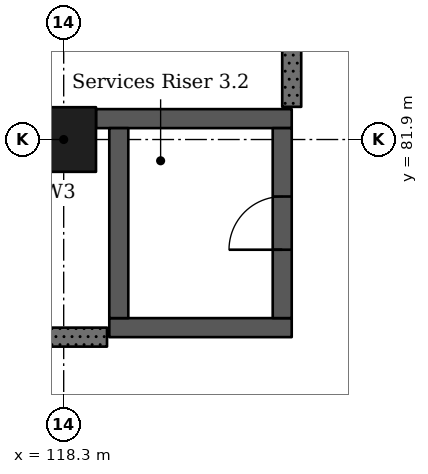
"""IFC4 building model, lengths in metres.
Left out: names, types, materials, properties, quantities, classifications, styles, units other than length and angle.
Written with IfcOpenShell. Run it as: python <this file> out.ifc"""

import sys

from ifc_helpers import new_model, si_unit, direction, frame, frame_2d, origin, origin_2d, place, context, subcontext, project, spatial, rectangle, extrude, element, fill, save


model = new_model("IFC4")
c1 = context("Model", 3, precision=1e-05, world=origin(), true_north=direction((0.0, 1.0)))
c2 = subcontext(c1, "Body", "Model", "MODEL_VIEW")
j1 = project(units=[si_unit("LENGTHUNIT", "METRE"), si_unit("PLANEANGLEUNIT", "RADIAN")], contexts=[c1])
p1 = place(None, origin())
s1 = spatial("IfcSite", under=j1, at=p1, CompositionType="ELEMENT")
p2 = place(p1, origin())
s2 = spatial("IfcBuilding", under=s1, at=p2, CompositionType="ELEMENT")
p3 = place(p2, origin())
s3 = spatial("IfcBuildingStorey", under=s2, at=p3, CompositionType="ELEMENT", Elevation=0.0)
p4 = place(p3, frame((118.3, 81.9, -0.4), z_axis=(0.0, 0.0, 1.0), x_axis=(1.0, 0.0, 0.0)))
e1 = element("IfcColumn", 1, at=p4, inside=s3, PredefinedType="COLUMN", context=c2, shape_type="SweptSolid", body=[
    extrude(rectangle(XDim=0.85, YDim=0.85, at=origin_2d()), origin(), (0.0, 0.0, 1.0), 6.77),
])
p5 = place(p3, frame((121.3, 79.425, -0.4), z_axis=(0.0, 0.0, 1.0), x_axis=(-1.0, 0.0, 0.0)))
e2 = element("IfcWall", 2, at=p5, inside=s3, PredefinedType="SHEAR", context=c2, shape_type="SweptSolid", body=[
    extrude(rectangle(XDim=2.4, YDim=0.25, at=frame_2d((1.2, 0.0))), origin(), (0.0, 0.0, 1.0), 6.77),
])
p6 = place(p3, frame((121.3, 82.175, -0.4), z_axis=(0.0, 0.0, 1.0), x_axis=(-1.0, 0.0, 0.0)))
e3 = element("IfcWall", 3, at=p6, inside=s3, PredefinedType="SHEAR", context=c2, shape_type="SweptSolid", body=[
    extrude(rectangle(XDim=2.575, YDim=0.25, at=frame_2d((1.288, 0.0))), origin(), (0.0, 0.0, 1.0), 6.77),
])
p7 = place(p3, frame((119.025, 82.05, -0.4), z_axis=(0.0, 0.0, 1.0), x_axis=(0.0, -1.0, 0.0)))
e4 = element("IfcWall", 4, at=p7, inside=s3, PredefinedType="SHEAR", context=c2, shape_type="SweptSolid", body=[
    extrude(rectangle(XDim=2.5, YDim=0.25, at=frame_2d((1.25, 0.0))), origin(), (0.0, 0.0, 1.0), 6.77),
])
p8 = place(p3, frame((121.175, 82.05, -0.4), z_axis=(0.0, 0.0, 1.0), x_axis=(0.0, -1.0, 0.0)))
e5 = element("IfcWall", 5, at=p8, inside=s3, PredefinedType="SHEAR", context=c2, shape_type="SweptSolid", body=[
    extrude(rectangle(XDim=2.5, YDim=0.25, at=frame_2d((1.25, 0.0))), origin(), (0.0, 0.0, 1.0), 6.77),
])
p9 = place(p8, frame((0.9, 0.0, 0.4)))
e6 = element("IfcOpeningElement", 6, at=p9, cuts=e5, PredefinedType="OPENING", context=c2, shape_type="SweptSolid", body=[
    extrude(rectangle(XDim=0.7, YDim=2.1, at=frame_2d((0.35, 1.05))), frame((0.0, 0.135, 0.0), z_axis=(0.0, -1.0, 0.0), x_axis=(1.0, 0.0, 0.0)), (0.0, 0.0, 1.0), 0.27),
])
p10 = place(p3, frame((118.87, 79.3, 0.0), z_axis=(0.0, 0.0, 1.0), x_axis=(-1.0, 0.0, 0.0)))
e7 = element("IfcWall", 7, at=p10, inside=s3, PredefinedType="SOLIDWALL", context=c2, shape_type="SweptSolid", body=[
    extrude(rectangle(XDim=1.495, YDim=0.25, at=frame_2d((0.748, 0.0))), origin(), (0.0, 0.0, 1.0), 6.02),
])
p11 = place(p3, frame((121.3, 82.33, 0.0), z_axis=(0.0, 0.0, 1.0), x_axis=(0.0, 1.0, 0.0)))
e8 = element("IfcWall", 8, at=p11, inside=s3, PredefinedType="SOLIDWALL", context=c2, shape_type="SweptSolid", body=[
    extrude(rectangle(XDim=6.945, YDim=0.25, at=frame_2d((3.472, 0.0))), origin(), (0.0, 0.0, 1.0), 6.02),
])
p12 = place(p9, origin())
e9 = element("IfcDoor", 9, at=p12, inside=s3, OperationType="SINGLE_SWING_RIGHT", PredefinedType="DOOR", context=c2, shape_type="SweptSolid", body=[
    extrude(rectangle(XDim=0.7, YDim=2.1, at=frame_2d((0.35, 1.05))), frame((0.0, 0.025, 0.0), z_axis=(0.0, -1.0, 0.0), x_axis=(1.0, 0.0, 0.0)), (0.0, 0.0, 1.0), 0.05),
])
fill(e6, e9)
save(model, sys.argv[1])
